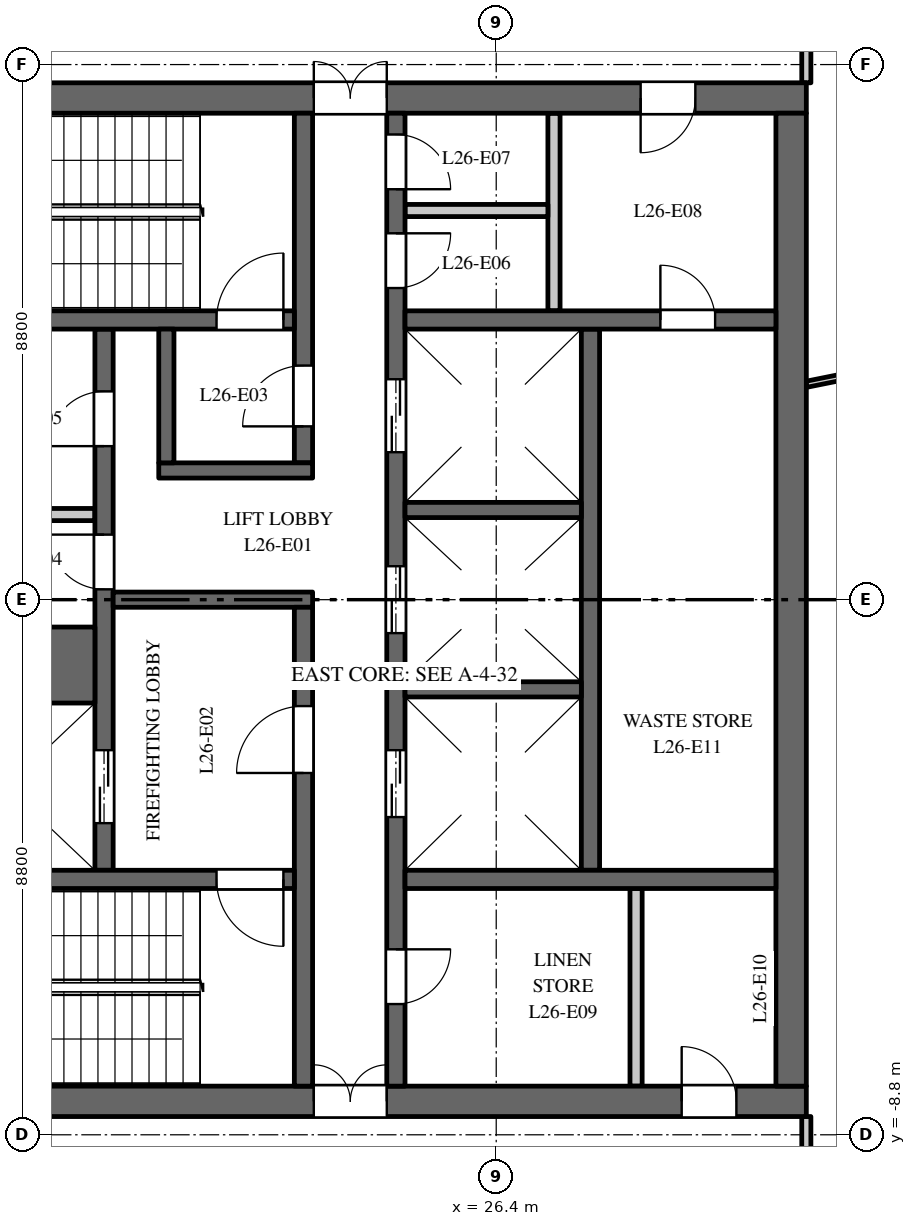
"""IFC4 building model, lengths in metres.
Left out: names, types, materials, properties, quantities, classifications, styles, units other than length and angle.
Written with IfcOpenShell. Run it as: python <this file> out.ifc"""

import sys

from ifc_helpers import new_model, si_unit, direction, frame, frame_2d, origin, place, context, subcontext, project, spatial, rectangle, extrude, element, fill, save


model = new_model("IFC4")
c1 = context("Model", 3, precision=1e-05, world=origin(), true_north=direction((0.0, 1.0)))
c2 = subcontext(c1, "Body", "Model", "MODEL_VIEW")
j1 = project(units=[si_unit("LENGTHUNIT", "METRE"), si_unit("PLANEANGLEUNIT", "RADIAN")], contexts=[c1])
p1 = place(None, origin())
s1 = spatial("IfcSite", under=j1, at=p1, CompositionType="ELEMENT")
p2 = place(p1, origin())
s2 = spatial("IfcBuilding", under=s1, at=p2, CompositionType="ELEMENT")
p3 = place(p2, frame((0.0, 0.0, 116.0)))
s3 = spatial("IfcBuildingStorey", under=s2, at=p3, CompositionType="ELEMENT", Elevation=116.0)
p4 = place(p3, frame((16.5, 8.25, 0.0), z_axis=(0.0, 0.0, 1.0), x_axis=(1.0, 0.0, 0.0)))
e1 = element("IfcWall", 1, at=p4, inside=s3, PredefinedType="SHEAR", context=c2, shape_type="SweptSolid", body=[
    extrude(rectangle(XDim=15.0, YDim=0.5, at=frame_2d((7.5, 0.0))), origin(), (0.0, 0.0, 1.0), 3.7),
])
p5 = place(p4, frame((6.9, 0.0, 0.0)))
e2 = element("IfcOpeningElement", 2, at=p5, cuts=e1, PredefinedType="OPENING", context=c2, shape_type="SweptSolid", body=[
    extrude(rectangle(XDim=1.2, YDim=2.1, at=frame_2d((0.6, 1.05))), frame((0.0, 0.26, 0.0), z_axis=(0.0, -1.0, 0.0), x_axis=(1.0, 0.0, 0.0)), (0.0, 0.0, 1.0), 0.52),
])
p6 = place(p4, frame((12.275, 0.0, 0.0)))
e3 = element("IfcOpeningElement", 3, at=p6, cuts=e1, PredefinedType="OPENING", context=c2, shape_type="SweptSolid", body=[
    extrude(rectangle(XDim=0.9, YDim=2.1, at=frame_2d((0.45, 1.05))), frame((0.0, 0.26, 0.0), z_axis=(0.0, -1.0, 0.0), x_axis=(1.0, 0.0, 0.0)), (0.0, 0.0, 1.0), 0.52),
])
p7 = place(p3, frame((16.5, -8.25, 0.0), z_axis=(0.0, 0.0, 1.0), x_axis=(1.0, 0.0, 0.0)))
e4 = element("IfcWall", 4, at=p7, inside=s3, PredefinedType="SHEAR", context=c2, shape_type="SweptSolid", body=[
    extrude(rectangle(XDim=15.0, YDim=0.5, at=frame_2d((7.5, 0.0))), origin(), (0.0, 0.0, 1.0), 3.7),
])
p8 = place(p7, frame((6.9, 0.0, 0.0)))
e5 = element("IfcOpeningElement", 5, at=p8, cuts=e4, PredefinedType="OPENING", context=c2, shape_type="SweptSolid", body=[
    extrude(rectangle(XDim=1.2, YDim=2.1, at=frame_2d((0.6, 1.05))), frame((0.0, 0.26, 0.0), z_axis=(0.0, -1.0, 0.0), x_axis=(1.0, 0.0, 0.0)), (0.0, 0.0, 1.0), 0.52),
])
p9 = place(p7, frame((12.95, 0.0, 0.0)))
e6 = element("IfcOpeningElement", 6, at=p9, cuts=e4, PredefinedType="OPENING", context=c2, shape_type="SweptSolid", body=[
    extrude(rectangle(XDim=0.9, YDim=2.1, at=frame_2d((0.45, 1.05))), frame((0.0, 0.26, 0.0), z_axis=(0.0, -1.0, 0.0), x_axis=(1.0, 0.0, 0.0)), (0.0, 0.0, 1.0), 0.52),
])
p10 = place(p3, frame((16.9, 1.4, 0.0), z_axis=(0.0, 0.0, 1.0), x_axis=(1.0, 0.0, 0.0)))
e7 = element("IfcWall", 7, at=p10, inside=s3, PredefinedType="PARTITIONING", context=c2, shape_type="SweptSolid", body=[
    extrude(rectangle(XDim=2.9, YDim=0.2, at=frame_2d((1.45, 0.0))), origin(), (0.0, 0.0, 1.0), 3.7),
])
p11 = place(p3, frame((27.95, -4.45, 0.0), z_axis=(0.0, 0.0, 1.0), x_axis=(0.0, 1.0, 0.0)))
e8 = element("IfcWall", 8, at=p11, inside=s3, PredefinedType="SHEAR", context=c2, shape_type="SweptSolid", body=[
    extrude(rectangle(XDim=8.9, YDim=0.3, at=frame_2d((4.45, 0.0))), origin(), (0.0, 0.0, 1.0), 3.7),
])
p12 = place(p3, frame((19.95, -4.45, 0.0), z_axis=(0.0, 0.0, 1.0), x_axis=(0.0, 1.0, 0.0)))
e9 = element("IfcWall", 9, at=p12, inside=s3, PredefinedType="SHEAR", context=c2, shape_type="SweptSolid", body=[
    extrude(rectangle(XDim=8.9, YDim=0.3, at=frame_2d((4.45, 0.0))), origin(), (0.0, 0.0, 1.0), 3.7),
])
p13 = place(p12, frame((0.775, 0.0, 0.0)))
e10 = element("IfcOpeningElement", 10, at=p13, cuts=e9, PredefinedType="OPENING", context=c2, shape_type="SweptSolid", body=[
    extrude(rectangle(XDim=1.2, YDim=2.1, at=frame_2d((0.6, 1.05))), frame((0.0, 0.16, 0.0), z_axis=(0.0, -1.0, 0.0), x_axis=(1.0, 0.0, 0.0)), (0.0, 0.0, 1.0), 0.32),
])
p14 = place(p12, frame((4.62, 0.0, 0.0)))
e11 = element("IfcOpeningElement", 11, at=p14, cuts=e9, PredefinedType="OPENING", context=c2, shape_type="SweptSolid", body=[
    extrude(rectangle(XDim=0.9, YDim=2.1, at=frame_2d((0.45, 1.05))), frame((0.0, 0.16, 0.0), z_axis=(0.0, -1.0, 0.0), x_axis=(1.0, 0.0, 0.0)), (0.0, 0.0, 1.0), 0.32),
])
p15 = place(p12, frame((6.975, 0.0, 0.0)))
e12 = element("IfcOpeningElement", 12, at=p15, cuts=e9, PredefinedType="OPENING", context=c2, shape_type="SweptSolid", body=[
    extrude(rectangle(XDim=0.9, YDim=2.1, at=frame_2d((0.45, 1.05))), frame((0.0, 0.16, 0.0), z_axis=(0.0, -1.0, 0.0), x_axis=(1.0, 0.0, 0.0)), (0.0, 0.0, 1.0), 0.32),
])
p16 = place(p3, frame((24.75, -8.0, 0.0), z_axis=(0.0, 0.0, 1.0), x_axis=(0.0, 1.0, 0.0)))
e13 = element("IfcWall", 13, at=p16, inside=s3, PredefinedType="SHEAR", context=c2, shape_type="SweptSolid", body=[
    extrude(rectangle(XDim=16.0, YDim=0.3, at=frame_2d((8.0, 0.0))), origin(), (0.0, 0.0, 1.0), 3.7),
])
p17 = place(p16, frame((4.425, 0.0, 0.0)))
e14 = element("IfcOpeningElement", 14, at=p17, cuts=e13, PredefinedType="OPENING", context=c2, shape_type="SweptSolid", body=[
    extrude(rectangle(XDim=1.1, YDim=2.1, at=frame_2d((0.55, 1.05))), frame((0.0, 0.16, 0.0), z_axis=(0.0, -1.0, 0.0), x_axis=(1.0, 0.0, 0.0)), (0.0, 0.0, 1.0), 0.32),
])
p18 = place(p16, frame((7.45, 0.0, 0.0)))
e15 = element("IfcOpeningElement", 15, at=p18, cuts=e13, PredefinedType="OPENING", context=c2, shape_type="SweptSolid", body=[
    extrude(rectangle(XDim=1.1, YDim=2.1, at=frame_2d((0.55, 1.05))), frame((0.0, 0.16, 0.0), z_axis=(0.0, -1.0, 0.0), x_axis=(1.0, 0.0, 0.0)), (0.0, 0.0, 1.0), 0.32),
])
p19 = place(p16, frame((10.425, 0.0, 0.0)))
e16 = element("IfcOpeningElement", 16, at=p19, cuts=e13, PredefinedType="OPENING", context=c2, shape_type="SweptSolid", body=[
    extrude(rectangle(XDim=1.2, YDim=2.1, at=frame_2d((0.6, 1.05))), frame((0.0, 0.16, 0.0), z_axis=(0.0, -1.0, 0.0), x_axis=(1.0, 0.0, 0.0)), (0.0, 0.0, 1.0), 0.32),
])
p20 = place(p16, frame((13.125, 0.0, 0.0)))
e17 = element("IfcOpeningElement", 17, at=p20, cuts=e13, PredefinedType="OPENING", context=c2, shape_type="SweptSolid", body=[
    extrude(rectangle(XDim=0.9, YDim=2.1, at=frame_2d((0.45, 1.05))), frame((0.0, 0.16, 0.0), z_axis=(0.0, -1.0, 0.0), x_axis=(1.0, 0.0, 0.0)), (0.0, 0.0, 1.0), 0.32),
])
p21 = place(p16, frame((14.75, 0.0, 0.0)))
e18 = element("IfcOpeningElement", 18, at=p21, cuts=e13, PredefinedType="OPENING", context=c2, shape_type="SweptSolid", body=[
    extrude(rectangle(XDim=0.9, YDim=2.1, at=frame_2d((0.45, 1.05))), frame((0.0, 0.16, 0.0), z_axis=(0.0, -1.0, 0.0), x_axis=(1.0, 0.0, 0.0)), (0.0, 0.0, 1.0), 0.32),
])
p22 = place(p16, frame((1.35, 0.0, 0.0)))
e19 = element("IfcOpeningElement", 19, at=p22, cuts=e13, PredefinedType="OPENING", context=c2, shape_type="SweptSolid", body=[
    extrude(rectangle(XDim=0.9, YDim=2.1, at=frame_2d((0.45, 1.05))), frame((0.0, 0.16, 0.0), z_axis=(0.0, -1.0, 0.0), x_axis=(1.0, 0.0, 0.0)), (0.0, 0.0, 1.0), 0.32),
])
p23 = place(p3, frame((20.1, 0.0, 0.0), z_axis=(0.0, 0.0, 1.0), x_axis=(1.0, 0.0, 0.0)))
e20 = element("IfcWall", 20, at=p23, inside=s3, PredefinedType="SHEAR", context=c2, shape_type="SweptSolid", body=[
    extrude(rectangle(XDim=3.28, YDim=0.25, at=frame_2d((1.64, 0.0))), origin(), (0.0, 0.0, 1.0), 3.7),
])
p24 = place(p3, frame((31.25, -8.0, 0.0), z_axis=(0.0, 0.0, 1.0), x_axis=(0.0, 1.0, 0.0)))
e21 = element("IfcWall", 21, at=p24, inside=s3, PredefinedType="SHEAR", context=c2, shape_type="SweptSolid", body=[
    extrude(rectangle(XDim=16.0, YDim=0.5, at=frame_2d((8.0, 0.0))), origin(), (0.0, 0.0, 1.0), 3.7),
])
p25 = place(p3, frame((24.9, 4.6, 0.0), z_axis=(0.0, 0.0, 1.0), x_axis=(1.0, 0.0, 0.0)))
e22 = element("IfcWall", 22, at=p25, inside=s3, PredefinedType="SHEAR", context=c2, shape_type="SweptSolid", body=[
    extrude(rectangle(XDim=6.1, YDim=0.3, at=frame_2d((3.05, 0.0))), origin(), (0.0, 0.0, 1.0), 3.7),
])
p26 = place(p25, frame((4.2, 0.0, 0.0)))
e23 = element("IfcOpeningElement", 23, at=p26, cuts=e22, PredefinedType="OPENING", context=c2, shape_type="SweptSolid", body=[
    extrude(rectangle(XDim=0.9, YDim=2.1, at=frame_2d((0.45, 1.05))), frame((0.0, 0.16, 0.0), z_axis=(0.0, -1.0, 0.0), x_axis=(1.0, 0.0, 0.0)), (0.0, 0.0, 1.0), 0.32),
])
for number, where, z_axis, x_axis in (
    (24, (27.35, 4.75, 0.0), (0.0, 0.0, 1.0), (0.0, 1.0, 0.0)),
    (25, (28.7, -8.0, 0.0), (0.0, 0.0, 1.0), (0.0, 1.0, 0.0)),
):
    element("IfcWall", number, at=place(p3, frame(where, z_axis=z_axis, x_axis=x_axis)), inside=s3, PredefinedType="PARTITIONING", context=c2, shape_type="SweptSolid", body=[
        extrude(rectangle(XDim=3.25, YDim=0.2, at=frame_2d((1.625, 0.0))), origin(), (0.0, 0.0, 1.0), 3.7),
    ])
p27 = place(p3, frame((24.9, 6.4, 0.0), z_axis=(0.0, 0.0, 1.0), x_axis=(1.0, 0.0, 0.0)))
e26 = element("IfcWall", 26, at=p27, inside=s3, PredefinedType="PARTITIONING", context=c2, shape_type="SweptSolid", body=[
    extrude(rectangle(XDim=2.35, YDim=0.2, at=frame_2d((1.175, 0.0))), origin(), (0.0, 0.0, 1.0), 3.7),
])
p28 = place(p3, frame((24.9, -4.6, 0.0), z_axis=(0.0, 0.0, 1.0), x_axis=(1.0, 0.0, 0.0)))
e27 = element("IfcWall", 27, at=p28, inside=s3, PredefinedType="SHEAR", context=c2, shape_type="SweptSolid", body=[
    extrude(rectangle(XDim=6.1, YDim=0.3, at=frame_2d((3.05, 0.0))), origin(), (0.0, 0.0, 1.0), 3.7),
])
p29 = place(p3, frame((16.9, -1.075, 0.0), z_axis=(0.0, 0.0, 1.0), x_axis=(1.0, 0.0, 0.0)))
e28 = element("IfcWall", 28, at=p29, inside=s3, PredefinedType="SHEAR", context=c2, shape_type="SweptSolid", body=[
    extrude(rectangle(XDim=2.9, YDim=1.25, at=frame_2d((1.45, 0.0))), origin(), (0.0, 0.0, 1.0), 3.7),
])
for number, where, z_axis, x_axis in (
    (29, (24.9, -1.475, 0.0), (0.0, 0.0, 1.0), (1.0, 0.0, 0.0)),
    (30, (24.9, 1.475, 0.0), (0.0, 0.0, 1.0), (1.0, 0.0, 0.0)),
):
    element("IfcWall", number, at=place(p3, frame(where, z_axis=z_axis, x_axis=x_axis)), inside=s3, PredefinedType="SHEAR", context=c2, shape_type="SweptSolid", body=[
        extrude(rectangle(XDim=2.9, YDim=0.25, at=frame_2d((1.45, 0.0))), origin(), (0.0, 0.0, 1.0), 3.7),
    ])
p30 = place(p3, frame((23.23, 2.25, 0.0), z_axis=(0.0, 0.0, 1.0), x_axis=(0.0, 1.0, 0.0)))
e31 = element("IfcWall", 31, at=p30, inside=s3, PredefinedType="SHEAR", context=c2, shape_type="SweptSolid", body=[
    extrude(rectangle(XDim=5.75, YDim=0.3, at=frame_2d((2.875, 0.0))), origin(), (0.0, 0.0, 1.0), 3.7),
])
p31 = place(p30, frame((0.6, 0.0, 0.0)))
e32 = element("IfcOpeningElement", 32, at=p31, cuts=e31, PredefinedType="OPENING", context=c2, shape_type="SweptSolid", body=[
    extrude(rectangle(XDim=1.0, YDim=2.1, at=frame_2d((0.5, 1.05))), frame((0.0, 0.16, 0.0), z_axis=(0.0, -1.0, 0.0), x_axis=(1.0, 0.0, 0.0)), (0.0, 0.0, 1.0), 0.32),
])
p32 = place(p3, frame((23.23, -8.0, 0.0), z_axis=(0.0, 0.0, 1.0), x_axis=(0.0, 1.0, 0.0)))
e33 = element("IfcWall", 33, at=p32, inside=s3, PredefinedType="SHEAR", context=c2, shape_type="SweptSolid", body=[
    extrude(rectangle(XDim=7.875, YDim=0.3, at=frame_2d((3.938, 0.0))), origin(), (0.0, 0.0, 1.0), 3.7),
])
p33 = place(p32, frame((5.15, 0.0, 0.0)))
e34 = element("IfcOpeningElement", 34, at=p33, cuts=e33, PredefinedType="OPENING", context=c2, shape_type="SweptSolid", body=[
    extrude(rectangle(XDim=1.1, YDim=2.1, at=frame_2d((0.55, 1.05))), frame((0.0, 0.16, 0.0), z_axis=(0.0, -1.0, 0.0), x_axis=(1.0, 0.0, 0.0)), (0.0, 0.0, 1.0), 0.32),
])
p34 = place(p3, frame((16.9, 4.6, 0.0), z_axis=(0.0, 0.0, 1.0), x_axis=(1.0, 0.0, 0.0)))
e35 = element("IfcWall", 35, at=p34, inside=s3, PredefinedType="SHEAR", context=c2, shape_type="SweptSolid", body=[
    extrude(rectangle(XDim=6.18, YDim=0.3, at=frame_2d((3.09, 0.0))), origin(), (0.0, 0.0, 1.0), 3.7),
])
p35 = place(p34, frame((4.9, 0.0, 0.0)))
e36 = element("IfcOpeningElement", 36, at=p35, cuts=e35, PredefinedType="OPENING", context=c2, shape_type="SweptSolid", body=[
    extrude(rectangle(XDim=1.1, YDim=2.1, at=frame_2d((0.55, 1.05))), frame((0.0, 0.16, 0.0), z_axis=(0.0, -1.0, 0.0), x_axis=(1.0, 0.0, 0.0)), (0.0, 0.0, 1.0), 0.32),
])
p36 = place(p3, frame((16.9, -4.6, 0.0), z_axis=(0.0, 0.0, 1.0), x_axis=(1.0, 0.0, 0.0)))
e37 = element("IfcWall", 37, at=p36, inside=s3, PredefinedType="SHEAR", context=c2, shape_type="SweptSolid", body=[
    extrude(rectangle(XDim=6.18, YDim=0.3, at=frame_2d((3.09, 0.0))), origin(), (0.0, 0.0, 1.0), 3.7),
])
p37 = place(p36, frame((4.9, 0.0, 0.0)))
e38 = element("IfcOpeningElement", 38, at=p37, cuts=e37, PredefinedType="OPENING", context=c2, shape_type="SweptSolid", body=[
    extrude(rectangle(XDim=1.1, YDim=2.1, at=frame_2d((0.55, 1.05))), frame((0.0, 0.16, 0.0), z_axis=(0.0, -1.0, 0.0), x_axis=(1.0, 0.0, 0.0)), (0.0, 0.0, 1.0), 0.32),
])
p38 = place(p3, frame((20.85, 2.125, 0.0), z_axis=(0.0, 0.0, 1.0), x_axis=(1.0, 0.0, 0.0)))
e39 = element("IfcWall", 39, at=p38, inside=s3, PredefinedType="SHEAR", context=c2, shape_type="SweptSolid", body=[
    extrude(rectangle(XDim=2.53, YDim=0.25, at=frame_2d((1.265, 0.0))), origin(), (0.0, 0.0, 1.0), 3.7),
])
p39 = place(p3, frame((20.975, 2.25, 0.0), z_axis=(0.0, 0.0, 1.0), x_axis=(0.0, 1.0, 0.0)))
e40 = element("IfcWall", 40, at=p39, inside=s3, PredefinedType="SHEAR", context=c2, shape_type="SweptSolid", body=[
    extrude(rectangle(XDim=2.2, YDim=0.25, at=frame_2d((1.1, 0.0))), origin(), (0.0, 0.0, 1.0), 3.7),
])
p40 = place(p3, frame((31.5, -10.7, 0.0), z_axis=(0.0, 0.0, 1.0), x_axis=(0.0, 1.0, 0.0)))
e41 = element("IfcWall", 41, at=p40, inside=s3, PredefinedType="PARTITIONING", context=c2, shape_type="SweptSolid", body=[
    extrude(rectangle(XDim=2.2, YDim=0.15, at=frame_2d((1.1, 0.0))), origin(), (0.0, 0.0, 1.0), 2.9),
])
p41 = place(p40, frame((0.65, 0.0, 0.0)))
e42 = element("IfcOpeningElement", 42, at=p41, cuts=e41, PredefinedType="OPENING", context=c2, shape_type="SweptSolid", body=[
    extrude(rectangle(XDim=1.0, YDim=2.1, at=frame_2d((0.5, 1.05))), frame((0.0, 0.085, 0.0), z_axis=(0.0, -1.0, 0.0), x_axis=(1.0, 0.0, 0.0)), (0.0, 0.0, 1.0), 0.17),
])
p42 = place(p3, frame((31.5, 3.542, 0.0), z_axis=(0.0, 0.0, 1.0), x_axis=(0.980357474535, 0.197228857227, 0.0)))
e43 = element("IfcWall", 43, at=p42, inside=s3, PredefinedType="PARTITIONING", context=c2, shape_type="SweptSolid", body=[
    extrude(rectangle(XDim=4.092, YDim=0.1, at=frame_2d((2.046, 0.0))), origin(), (0.0, 0.0, 1.0), 2.9),
])
p43 = place(p3, frame((31.5, 8.5, 0.0), z_axis=(0.0, 0.0, 1.0), x_axis=(0.0, 1.0, 0.0)))
e44 = element("IfcWall", 44, at=p43, inside=s3, PredefinedType="PARTITIONING", context=c2, shape_type="SweptSolid", body=[
    extrude(rectangle(XDim=2.2, YDim=0.15, at=frame_2d((1.1, 0.0))), origin(), (0.0, 0.0, 1.0), 2.9),
])
p44 = place(p13, origin())
e45 = element("IfcDoor", 45, at=p44, inside=s3, OperationType="DOUBLE_DOOR_SLIDING", PredefinedType="DOOR", context=c2, shape_type="SweptSolid", body=[
    extrude(rectangle(XDim=1.2, YDim=2.1, at=frame_2d((0.6, 1.05))), frame((0.0, 0.025, 0.0), z_axis=(0.0, -1.0, 0.0), x_axis=(1.0, 0.0, 0.0)), (0.0, 0.0, 1.0), 0.05),
])
fill(e10, e45)
p45 = place(p17, origin())
e46 = element("IfcDoor", 46, at=p45, inside=s3, OperationType="DOUBLE_DOOR_SLIDING", PredefinedType="DOOR", context=c2, shape_type="SweptSolid", body=[
    extrude(rectangle(XDim=1.1, YDim=2.1, at=frame_2d((0.55, 1.05))), frame((0.0, 0.025, 0.0), z_axis=(0.0, -1.0, 0.0), x_axis=(1.0, 0.0, 0.0)), (0.0, 0.0, 1.0), 0.05),
])
fill(e14, e46)
p46 = place(p18, origin())
e47 = element("IfcDoor", 47, at=p46, inside=s3, OperationType="DOUBLE_DOOR_SLIDING", PredefinedType="DOOR", context=c2, shape_type="SweptSolid", body=[
    extrude(rectangle(XDim=1.1, YDim=2.1, at=frame_2d((0.55, 1.05))), frame((0.0, 0.025, 0.0), z_axis=(0.0, -1.0, 0.0), x_axis=(1.0, 0.0, 0.0)), (0.0, 0.0, 1.0), 0.05),
])
fill(e15, e47)
p47 = place(p19, origin())
e48 = element("IfcDoor", 48, at=p47, inside=s3, OperationType="DOUBLE_DOOR_SLIDING", PredefinedType="DOOR", context=c2, shape_type="SweptSolid", body=[
    extrude(rectangle(XDim=1.2, YDim=2.1, at=frame_2d((0.6, 1.05))), frame((0.0, 0.025, 0.0), z_axis=(0.0, -1.0, 0.0), x_axis=(1.0, 0.0, 0.0)), (0.0, 0.0, 1.0), 0.05),
])
fill(e16, e48)
p48 = place(p35, origin())
e49 = element("IfcDoor", 49, at=p48, inside=s3, OperationType="SINGLE_SWING_LEFT", PredefinedType="DOOR", context=c2, shape_type="SweptSolid", body=[
    extrude(rectangle(XDim=1.1, YDim=2.1, at=frame_2d((0.55, 1.05))), frame((0.0, 0.025, 0.0), z_axis=(0.0, -1.0, 0.0), x_axis=(1.0, 0.0, 0.0)), (0.0, 0.0, 1.0), 0.05),
])
fill(e36, e49)
p49 = place(p37, origin())
e50 = element("IfcDoor", 50, at=p49, inside=s3, OperationType="SINGLE_SWING_RIGHT", PredefinedType="DOOR", context=c2, shape_type="SweptSolid", body=[
    extrude(rectangle(XDim=1.1, YDim=2.1, at=frame_2d((0.55, 1.05))), frame((0.0, 0.025, 0.0), z_axis=(0.0, -1.0, 0.0), x_axis=(1.0, 0.0, 0.0)), (0.0, 0.0, 1.0), 0.05),
])
fill(e38, e50)
p50 = place(p33, origin())
e51 = element("IfcDoor", 51, at=p50, inside=s3, OperationType="SINGLE_SWING_RIGHT", PredefinedType="DOOR", context=c2, shape_type="SweptSolid", body=[
    extrude(rectangle(XDim=1.1, YDim=2.1, at=frame_2d((0.55, 1.05))), frame((0.0, 0.025, 0.0), z_axis=(0.0, -1.0, 0.0), x_axis=(1.0, 0.0, 0.0)), (0.0, 0.0, 1.0), 0.05),
])
fill(e34, e51)
p51 = place(p31, origin())
e52 = element("IfcDoor", 52, at=p51, inside=s3, OperationType="SINGLE_SWING_RIGHT", PredefinedType="DOOR", context=c2, shape_type="SweptSolid", body=[
    extrude(rectangle(XDim=1.0, YDim=2.1, at=frame_2d((0.5, 1.05))), frame((0.0, 0.025, 0.0), z_axis=(0.0, -1.0, 0.0), x_axis=(1.0, 0.0, 0.0)), (0.0, 0.0, 1.0), 0.05),
])
fill(e32, e52)
p52 = place(p5, origin())
e53 = element("IfcDoor", 53, at=p52, inside=s3, OperationType="DOUBLE_DOOR_DOUBLE_SWING", PredefinedType="DOOR", context=c2, shape_type="SweptSolid", body=[
    extrude(rectangle(XDim=1.2, YDim=2.1, at=frame_2d((0.6, 1.05))), frame((0.0, 0.025, 0.0), z_axis=(0.0, -1.0, 0.0), x_axis=(1.0, 0.0, 0.0)), (0.0, 0.0, 1.0), 0.05),
])
fill(e2, e53)
p53 = place(p8, origin())
e54 = element("IfcDoor", 54, at=p53, inside=s3, OperationType="DOUBLE_DOOR_DOUBLE_SWING", PredefinedType="DOOR", context=c2, shape_type="SweptSolid", body=[
    extrude(rectangle(XDim=1.2, YDim=2.1, at=frame_2d((0.6, 1.05))), frame((0.0, 0.025, 0.0), z_axis=(0.0, -1.0, 0.0), x_axis=(1.0, 0.0, 0.0)), (0.0, 0.0, 1.0), 0.05),
])
fill(e5, e54)
p54 = place(p14, origin())
e55 = element("IfcDoor", 55, at=p54, inside=s3, OperationType="SINGLE_SWING_LEFT", PredefinedType="DOOR", context=c2, shape_type="SweptSolid", body=[
    extrude(rectangle(XDim=0.9, YDim=2.1, at=frame_2d((0.45, 1.05))), frame((0.0, 0.025, 0.0), z_axis=(0.0, -1.0, 0.0), x_axis=(1.0, 0.0, 0.0)), (0.0, 0.0, 1.0), 0.05),
])
fill(e11, e55)
p55 = place(p15, origin())
e56 = element("IfcDoor", 56, at=p55, inside=s3, OperationType="SINGLE_SWING_RIGHT", PredefinedType="DOOR", context=c2, shape_type="SweptSolid", body=[
    extrude(rectangle(XDim=0.9, YDim=2.1, at=frame_2d((0.45, 1.05))), frame((0.0, 0.025, 0.0), z_axis=(0.0, -1.0, 0.0), x_axis=(1.0, 0.0, 0.0)), (0.0, 0.0, 1.0), 0.05),
])
fill(e12, e56)
p56 = place(p20, origin())
e57 = element("IfcDoor", 57, at=p56, inside=s3, OperationType="SINGLE_SWING_RIGHT", PredefinedType="DOOR", context=c2, shape_type="SweptSolid", body=[
    extrude(rectangle(XDim=0.9, YDim=2.1, at=frame_2d((0.45, 1.05))), frame((0.0, 0.025, 0.0), z_axis=(0.0, -1.0, 0.0), x_axis=(1.0, 0.0, 0.0)), (0.0, 0.0, 1.0), 0.05),
])
fill(e17, e57)
p57 = place(p21, origin())
e58 = element("IfcDoor", 58, at=p57, inside=s3, OperationType="SINGLE_SWING_LEFT", PredefinedType="DOOR", context=c2, shape_type="SweptSolid", body=[
    extrude(rectangle(XDim=0.9, YDim=2.1, at=frame_2d((0.45, 1.05))), frame((0.0, 0.025, 0.0), z_axis=(0.0, -1.0, 0.0), x_axis=(1.0, 0.0, 0.0)), (0.0, 0.0, 1.0), 0.05),
])
fill(e18, e58)
p58 = place(p6, origin())
e59 = element("IfcDoor", 59, at=p58, inside=s3, OperationType="SINGLE_SWING_LEFT", PredefinedType="DOOR", context=c2, shape_type="SweptSolid", body=[
    extrude(rectangle(XDim=0.9, YDim=2.1, at=frame_2d((0.45, 1.05))), frame((0.0, 0.025, 0.0), z_axis=(0.0, -1.0, 0.0), x_axis=(1.0, 0.0, 0.0)), (0.0, 0.0, 1.0), 0.05),
])
fill(e3, e59)
p59 = place(p22, origin())
e60 = element("IfcDoor", 60, at=p59, inside=s3, OperationType="SINGLE_SWING_RIGHT", PredefinedType="DOOR", context=c2, shape_type="SweptSolid", body=[
    extrude(rectangle(XDim=0.9, YDim=2.1, at=frame_2d((0.45, 1.05))), frame((0.0, 0.025, 0.0), z_axis=(0.0, -1.0, 0.0), x_axis=(1.0, 0.0, 0.0)), (0.0, 0.0, 1.0), 0.05),
])
fill(e19, e60)
p60 = place(p9, origin())
e61 = element("IfcDoor", 61, at=p60, inside=s3, OperationType="SINGLE_SWING_RIGHT", PredefinedType="DOOR", context=c2, shape_type="SweptSolid", body=[
    extrude(rectangle(XDim=0.9, YDim=2.1, at=frame_2d((0.45, 1.05))), frame((0.0, 0.025, 0.0), z_axis=(0.0, -1.0, 0.0), x_axis=(1.0, 0.0, 0.0)), (0.0, 0.0, 1.0), 0.05),
])
fill(e6, e61)
p61 = place(p26, origin())
e62 = element("IfcDoor", 62, at=p61, inside=s3, OperationType="SINGLE_SWING_RIGHT", PredefinedType="DOOR", context=c2, shape_type="SweptSolid", body=[
    extrude(rectangle(XDim=0.9, YDim=2.1, at=frame_2d((0.45, 1.05))), frame((0.0, 0.025, 0.0), z_axis=(0.0, -1.0, 0.0), x_axis=(1.0, 0.0, 0.0)), (0.0, 0.0, 1.0), 0.05),
])
fill(e23, e62)
save(model, sys.argv[1])
